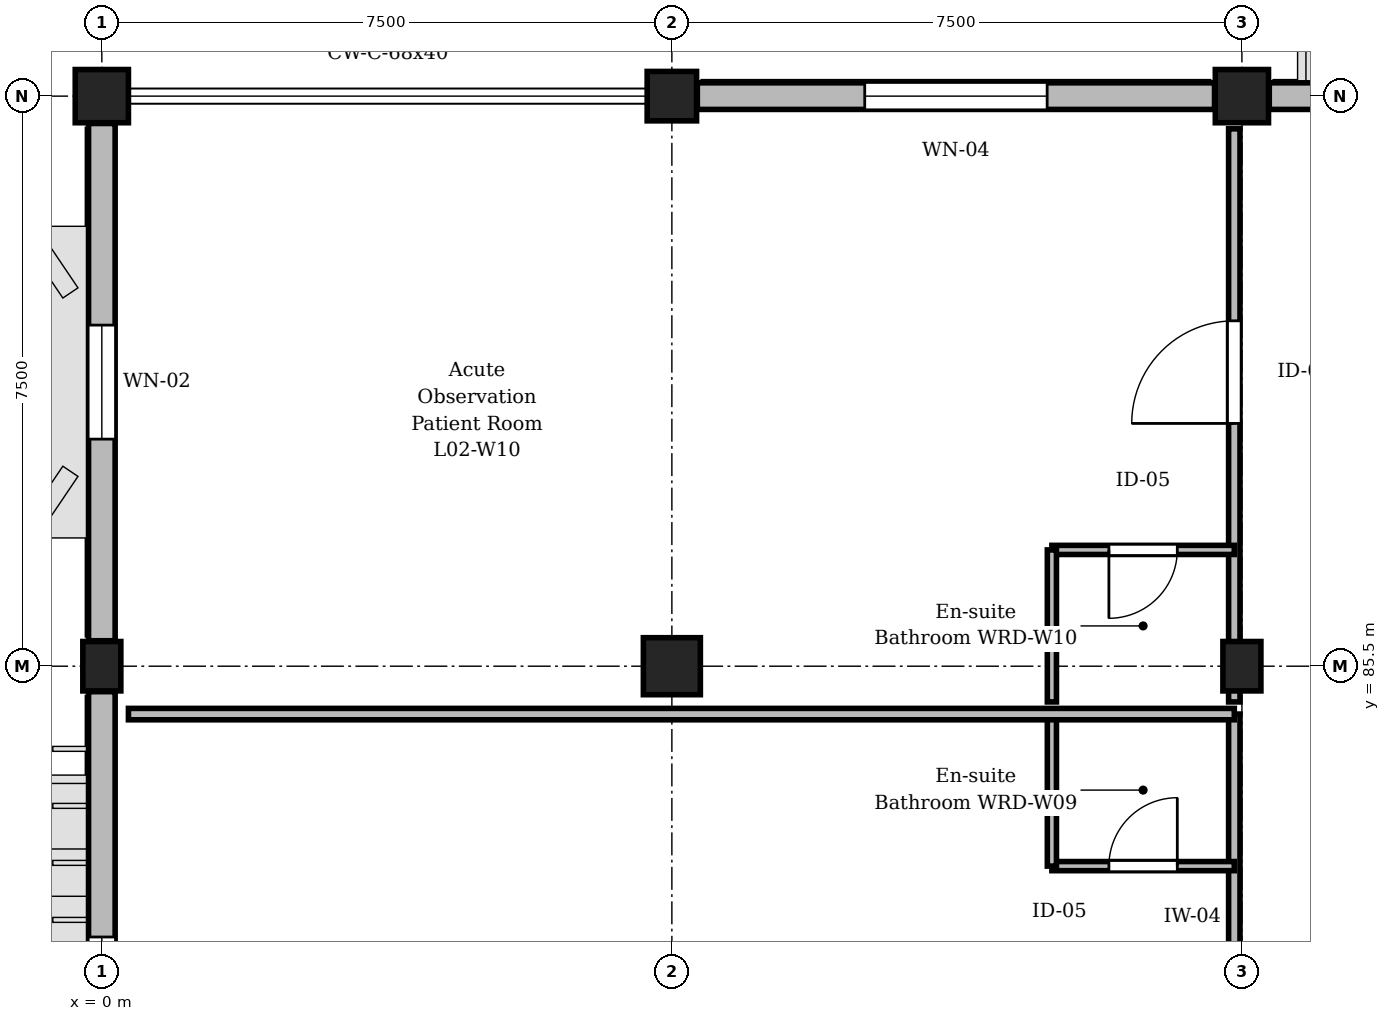
"""IFC4 building model, lengths in metres.
Left out: names, types, materials, properties, quantities, classifications, styles, units other than length and angle.
Written with IfcOpenShell. Run it as: python <this file> out.ifc"""

import sys

from ifc_helpers import new_model, si_unit, direction, frame, frame_2d, origin, origin_2d, place, context, subcontext, project, spatial, rectangle, extrude, element, fill, save


model = new_model("IFC4")
c1 = context("Model", 3, precision=1e-05, world=origin(), true_north=direction((0.0, 1.0)))
c2 = subcontext(c1, "Body", "Model", "MODEL_VIEW")
j1 = project(units=[si_unit("LENGTHUNIT", "METRE"), si_unit("PLANEANGLEUNIT", "RADIAN")], contexts=[c1])
p1 = place(None, origin())
s1 = spatial("IfcSite", under=j1, at=p1, CompositionType="ELEMENT")
p2 = place(p1, origin())
s2 = spatial("IfcBuilding", under=s1, at=p2, CompositionType="ELEMENT")
p3 = place(p2, frame((0.0, 0.0, 9.3)))
s3 = spatial("IfcBuildingStorey", under=s2, at=p3, CompositionType="ELEMENT", Elevation=9.3)
p4 = place(p3, frame((0.0, 85.5, 0.0), z_axis=(0.0, 0.0, 1.0), x_axis=(1.0, 0.0, 0.0)))
e1 = element("IfcColumn", 1, at=p4, inside=s3, PredefinedType="COLUMN", context=c2, shape_type="SweptSolid", body=[
    extrude(rectangle(XDim=0.5, YDim=0.65, at=origin_2d()), origin(), (0.0, 0.0, 1.0), 4.8),
])
p5 = place(p3, frame((0.0, 93.0, 0.0), z_axis=(0.0, 0.0, 1.0), x_axis=(1.0, 0.0, 0.0)))
e2 = element("IfcColumn", 2, at=p5, inside=s3, PredefinedType="COLUMN", context=c2, shape_type="SweptSolid", body=[
    extrude(rectangle(XDim=0.7, YDim=0.7, at=origin_2d()), origin(), (0.0, 0.0, 1.0), 4.8),
])
p6 = place(p3, frame((7.5, 85.5, 0.0), z_axis=(0.0, 0.0, 1.0), x_axis=(1.0, 0.0, 0.0)))
e3 = element("IfcColumn", 3, at=p6, inside=s3, PredefinedType="COLUMN", context=c2, shape_type="SweptSolid", body=[
    extrude(rectangle(XDim=0.75, YDim=0.75, at=origin_2d()), origin(), (0.0, 0.0, 1.0), 4.8),
])
p7 = place(p3, frame((7.5, 93.0, 0.0), z_axis=(0.0, 0.0, 1.0), x_axis=(1.0, 0.0, 0.0)))
e4 = element("IfcColumn", 4, at=p7, inside=s3, PredefinedType="COLUMN", context=c2, shape_type="SweptSolid", body=[
    extrude(rectangle(XDim=0.65, YDim=0.65, at=origin_2d()), origin(), (0.0, 0.0, 1.0), 4.8),
])
p8 = place(p3, frame((15.0, 85.5, 0.0), z_axis=(0.0, 0.0, 1.0), x_axis=(1.0, 0.0, 0.0)))
e5 = element("IfcColumn", 5, at=p8, inside=s3, PredefinedType="COLUMN", context=c2, shape_type="SweptSolid", body=[
    extrude(rectangle(XDim=0.5, YDim=0.65, at=origin_2d()), origin(), (0.0, 0.0, 1.0), 4.8),
])
p9 = place(p3, frame((15.0, 93.0, 0.0), z_axis=(0.0, 0.0, 1.0), x_axis=(1.0, 0.0, 0.0)))
e6 = element("IfcColumn", 6, at=p9, inside=s3, PredefinedType="COLUMN", context=c2, shape_type="SweptSolid", body=[
    extrude(rectangle(XDim=0.7, YDim=0.7, at=origin_2d()), origin(), (0.0, 0.0, 1.0), 4.8),
])
p10 = place(p3, frame((0.0, 76.91, 0.0), z_axis=(0.0, 0.0, 1.0), x_axis=(0.0, 1.0, 0.0)))
e7 = element("IfcWall", 7, at=p10, inside=s3, PredefinedType="STANDARD", context=c2, shape_type="SweptSolid", body=[
    extrude(rectangle(XDim=8.255, YDim=0.35, at=frame_2d((4.127, 0.0))), origin(), (0.0, 0.0, 1.0), 4.0),
])
p11 = place(p10, frame((3.228, 0.0, 0.9)))
e8 = element("IfcOpeningElement", 8, at=p11, cuts=e7, PredefinedType="OPENING", context=c2, shape_type="SweptSolid", body=[
    extrude(rectangle(XDim=1.8, YDim=2.4, at=frame_2d((0.9, 1.2))), frame((0.0, 0.185, 0.0), z_axis=(0.0, -1.0, 0.0), x_axis=(1.0, 0.0, 0.0)), (0.0, 0.0, 1.0), 0.37),
])
p12 = place(p3, frame((0.0, 85.835, 0.0), z_axis=(0.0, 0.0, 1.0), x_axis=(0.0, 1.0, 0.0)))
e9 = element("IfcWall", 9, at=p12, inside=s3, PredefinedType="STANDARD", context=c2, shape_type="SweptSolid", body=[
    extrude(rectangle(XDim=6.805, YDim=0.35, at=frame_2d((3.402, 0.0))), origin(), (0.0, 0.0, 1.0), 3.95),
])
p13 = place(p12, frame((2.653, 0.0, 0.9)))
e10 = element("IfcOpeningElement", 10, at=p13, cuts=e9, PredefinedType="OPENING", context=c2, shape_type="SweptSolid", body=[
    extrude(rectangle(XDim=1.5, YDim=2.4, at=frame_2d((0.75, 1.2))), frame((0.0, 0.185, 0.0), z_axis=(0.0, -1.0, 0.0), x_axis=(1.0, 0.0, 0.0)), (0.0, 0.0, 1.0), 0.37),
])
p14 = place(p3, frame((7.835, 93.0, 0.0), z_axis=(0.0, 0.0, 1.0), x_axis=(1.0, 0.0, 0.0)))
e11 = element("IfcWall", 11, at=p14, inside=s3, PredefinedType="STANDARD", context=c2, shape_type="SweptSolid", body=[
    extrude(rectangle(XDim=6.805, YDim=0.35, at=frame_2d((3.402, 0.0))), origin(), (0.0, 0.0, 1.0), 3.95),
])
p15 = place(p14, frame((2.202, 0.0, 0.9)))
e12 = element("IfcOpeningElement", 12, at=p15, cuts=e11, PredefinedType="OPENING", context=c2, shape_type="SweptSolid", body=[
    extrude(rectangle(XDim=2.4, YDim=2.5, at=frame_2d((1.2, 1.25))), frame((0.0, 0.185, 0.0), z_axis=(0.0, -1.0, 0.0), x_axis=(1.0, 0.0, 0.0)), (0.0, 0.0, 1.0), 0.37),
])
p16 = place(p3, frame((15.36, 93.0, 0.0), z_axis=(0.0, 0.0, 1.0), x_axis=(1.0, 0.0, 0.0)))
e13 = element("IfcWall", 13, at=p16, inside=s3, PredefinedType="STANDARD", context=c2, shape_type="SweptSolid", body=[
    extrude(rectangle(XDim=6.805, YDim=0.35, at=frame_2d((3.402, 0.0))), origin(), (0.0, 0.0, 1.0), 3.95),
])
p17 = place(p16, frame((2.502, 0.0, 0.9)))
e14 = element("IfcOpeningElement", 14, at=p17, cuts=e13, PredefinedType="OPENING", context=c2, shape_type="SweptSolid", body=[
    extrude(rectangle(XDim=1.8, YDim=2.1, at=frame_2d((0.9, 1.05))), frame((0.0, 0.185, 0.0), z_axis=(0.0, -1.0, 0.0), x_axis=(1.0, 0.0, 0.0)), (0.0, 0.0, 1.0), 0.37),
])
p18 = place(p3, frame((14.9, 77.33, 0.0), z_axis=(0.0, 0.0, 1.0), x_axis=(0.0, 1.0, 0.0)))
e15 = element("IfcWall", 15, at=p18, inside=s3, PredefinedType="PARTITIONING", context=c2, shape_type="SweptSolid", body=[
    extrude(rectangle(XDim=7.54, YDim=0.15, at=frame_2d((3.77, 0.0))), origin(), (0.0, 0.0, 1.0), 3.835),
])
p19 = place(p18, frame((3.045, 0.0, 0.0)))
e16 = element("IfcOpeningElement", 16, at=p19, cuts=e15, PredefinedType="OPENING", context=c2, shape_type="SweptSolid", body=[
    extrude(rectangle(XDim=1.45, YDim=2.3, at=frame_2d((0.725, 1.15))), frame((0.0, 0.085, 0.0), z_axis=(0.0, -1.0, 0.0), x_axis=(1.0, 0.0, 0.0)), (0.0, 0.0, 1.0), 0.17),
])
p20 = place(p3, frame((12.5, 82.87, 0.0), z_axis=(0.0, 0.0, 1.0), x_axis=(1.0, 0.0, 0.0)))
e17 = element("IfcWall", 17, at=p20, inside=s3, PredefinedType="PARTITIONING", context=c2, shape_type="SweptSolid", body=[
    extrude(rectangle(XDim=2.4, YDim=0.12, at=frame_2d((1.2, 0.0))), origin(), (0.0, 0.0, 1.0), 4.535),
])
p21 = place(p20, frame((0.75, 0.0, 0.0)))
e18 = element("IfcOpeningElement", 18, at=p21, cuts=e17, PredefinedType="OPENING", context=c2, shape_type="SweptSolid", body=[
    extrude(rectangle(XDim=0.9, YDim=2.1, at=frame_2d((0.45, 1.05))), frame((0.0, 0.07, 0.0), z_axis=(0.0, -1.0, 0.0), x_axis=(1.0, 0.0, 0.0)), (0.0, 0.0, 1.0), 0.14),
])
p22 = place(p3, frame((12.5, 82.87, 0.0), z_axis=(0.0, 0.0, 1.0), x_axis=(0.0, 1.0, 0.0)))
e19 = element("IfcWall", 19, at=p22, inside=s3, PredefinedType="PARTITIONING", context=c2, shape_type="SweptSolid", body=[
    extrude(rectangle(XDim=2.0, YDim=0.12, at=frame_2d((1.0, 0.0))), origin(), (0.0, 0.0, 1.0), 4.535),
])
p23 = place(p3, frame((14.9, 85.03, 0.0), z_axis=(0.0, 0.0, 1.0), x_axis=(0.0, 1.0, 0.0)))
e20 = element("IfcWall", 20, at=p23, inside=s3, PredefinedType="PARTITIONING", context=c2, shape_type="SweptSolid", body=[
    extrude(rectangle(XDim=7.54, YDim=0.15, at=frame_2d((3.77, 0.0))), origin(), (0.0, 0.0, 1.0), 3.835),
])
p24 = place(p23, frame((3.664, 0.0, 0.0)))
e21 = element("IfcOpeningElement", 21, at=p24, cuts=e20, PredefinedType="OPENING", context=c2, shape_type="SweptSolid", body=[
    extrude(rectangle(XDim=1.35, YDim=2.25, at=frame_2d((0.675, 1.125))), frame((0.0, 0.085, 0.0), z_axis=(0.0, -1.0, 0.0), x_axis=(1.0, 0.0, 0.0)), (0.0, 0.0, 1.0), 0.17),
])
p25 = place(p3, frame((14.9, 87.03, 0.0), z_axis=(0.0, 0.0, 1.0), x_axis=(-1.0, 0.0, 0.0)))
e22 = element("IfcWall", 22, at=p25, inside=s3, PredefinedType="PARTITIONING", context=c2, shape_type="SweptSolid", body=[
    extrude(rectangle(XDim=2.4, YDim=0.12, at=frame_2d((1.2, 0.0))), origin(), (0.0, 0.0, 1.0), 4.535),
])
p26 = place(p25, frame((0.75, 0.0, 0.0)))
e23 = element("IfcOpeningElement", 23, at=p26, cuts=e22, PredefinedType="OPENING", context=c2, shape_type="SweptSolid", body=[
    extrude(rectangle(XDim=0.9, YDim=2.1, at=frame_2d((0.45, 1.05))), frame((0.0, 0.07, 0.0), z_axis=(0.0, -1.0, 0.0), x_axis=(1.0, 0.0, 0.0)), (0.0, 0.0, 1.0), 0.14),
])
p27 = place(p3, frame((12.5, 85.03, 0.0), z_axis=(0.0, 0.0, 1.0), x_axis=(0.0, 1.0, 0.0)))
e24 = element("IfcWall", 24, at=p27, inside=s3, PredefinedType="PARTITIONING", context=c2, shape_type="SweptSolid", body=[
    extrude(rectangle(XDim=2.0, YDim=0.12, at=frame_2d((1.0, 0.0))), origin(), (0.0, 0.0, 1.0), 4.535),
])
p28 = place(p3, frame((0.35, 84.87, 0.0), z_axis=(0.0, 0.0, 1.0), x_axis=(1.0, 0.0, 0.0)))
e25 = element("IfcWall", 25, at=p28, inside=s3, PredefinedType="PARTITIONING", context=c2, shape_type="SweptSolid", body=[
    extrude(rectangle(XDim=14.55, YDim=0.15, at=frame_2d((7.275, 0.0))), origin(), (0.0, 0.0, 1.0), 4.535),
])
p29 = place(p11, origin())
e26 = element("IfcWindow", 26, at=p29, inside=s3, PartitioningType="SINGLE_PANEL", PredefinedType="WINDOW", context=c2, shape_type="SweptSolid", body=[
    extrude(rectangle(XDim=1.8, YDim=2.4, at=frame_2d((0.9, 1.2))), frame((0.0, 0.03, 0.0), z_axis=(0.0, -1.0, 0.0), x_axis=(1.0, 0.0, 0.0)), (0.0, 0.0, 1.0), 0.06),
])
fill(e8, e26)
p30 = place(p13, origin())
e27 = element("IfcWindow", 27, at=p30, inside=s3, PartitioningType="SINGLE_PANEL", PredefinedType="WINDOW", context=c2, shape_type="SweptSolid", body=[
    extrude(rectangle(XDim=1.5, YDim=2.4, at=frame_2d((0.75, 1.2))), frame((0.0, 0.03, 0.0), z_axis=(0.0, -1.0, 0.0), x_axis=(1.0, 0.0, 0.0)), (0.0, 0.0, 1.0), 0.06),
])
fill(e10, e27)
p31 = place(p15, origin())
e28 = element("IfcWindow", 28, at=p31, inside=s3, PartitioningType="SINGLE_PANEL", PredefinedType="WINDOW", context=c2, shape_type="SweptSolid", body=[
    extrude(rectangle(XDim=2.4, YDim=2.5, at=frame_2d((1.2, 1.25))), frame((0.0, 0.03, 0.0), z_axis=(0.0, -1.0, 0.0), x_axis=(1.0, 0.0, 0.0)), (0.0, 0.0, 1.0), 0.06),
])
fill(e12, e28)
p32 = place(p21, origin())
e29 = element("IfcDoor", 29, at=p32, inside=s3, OperationType="SINGLE_SWING_RIGHT", PredefinedType="DOOR", context=c2, shape_type="SweptSolid", body=[
    extrude(rectangle(XDim=0.9, YDim=2.1, at=frame_2d((0.45, 1.05))), frame((0.0, 0.025, 0.0), z_axis=(0.0, -1.0, 0.0), x_axis=(1.0, 0.0, 0.0)), (0.0, 0.0, 1.0), 0.05),
])
fill(e18, e29)
p33 = place(p24, origin())
e30 = element("IfcDoor", 30, at=p33, inside=s3, OperationType="SINGLE_SWING_LEFT", PredefinedType="DOOR", context=c2, shape_type="SweptSolid", body=[
    extrude(rectangle(XDim=1.35, YDim=2.25, at=frame_2d((0.675, 1.125))), frame((0.0, 0.025, 0.0), z_axis=(0.0, -1.0, 0.0), x_axis=(1.0, 0.0, 0.0)), (0.0, 0.0, 1.0), 0.05),
])
fill(e21, e30)
p34 = place(p26, origin())
e31 = element("IfcDoor", 31, at=p34, inside=s3, OperationType="SINGLE_SWING_RIGHT", PredefinedType="DOOR", context=c2, shape_type="SweptSolid", body=[
    extrude(rectangle(XDim=0.9, YDim=2.1, at=frame_2d((0.45, 1.05))), frame((0.0, 0.025, 0.0), z_axis=(0.0, -1.0, 0.0), x_axis=(1.0, 0.0, 0.0)), (0.0, 0.0, 1.0), 0.05),
])
fill(e23, e31)
save(model, sys.argv[1])
